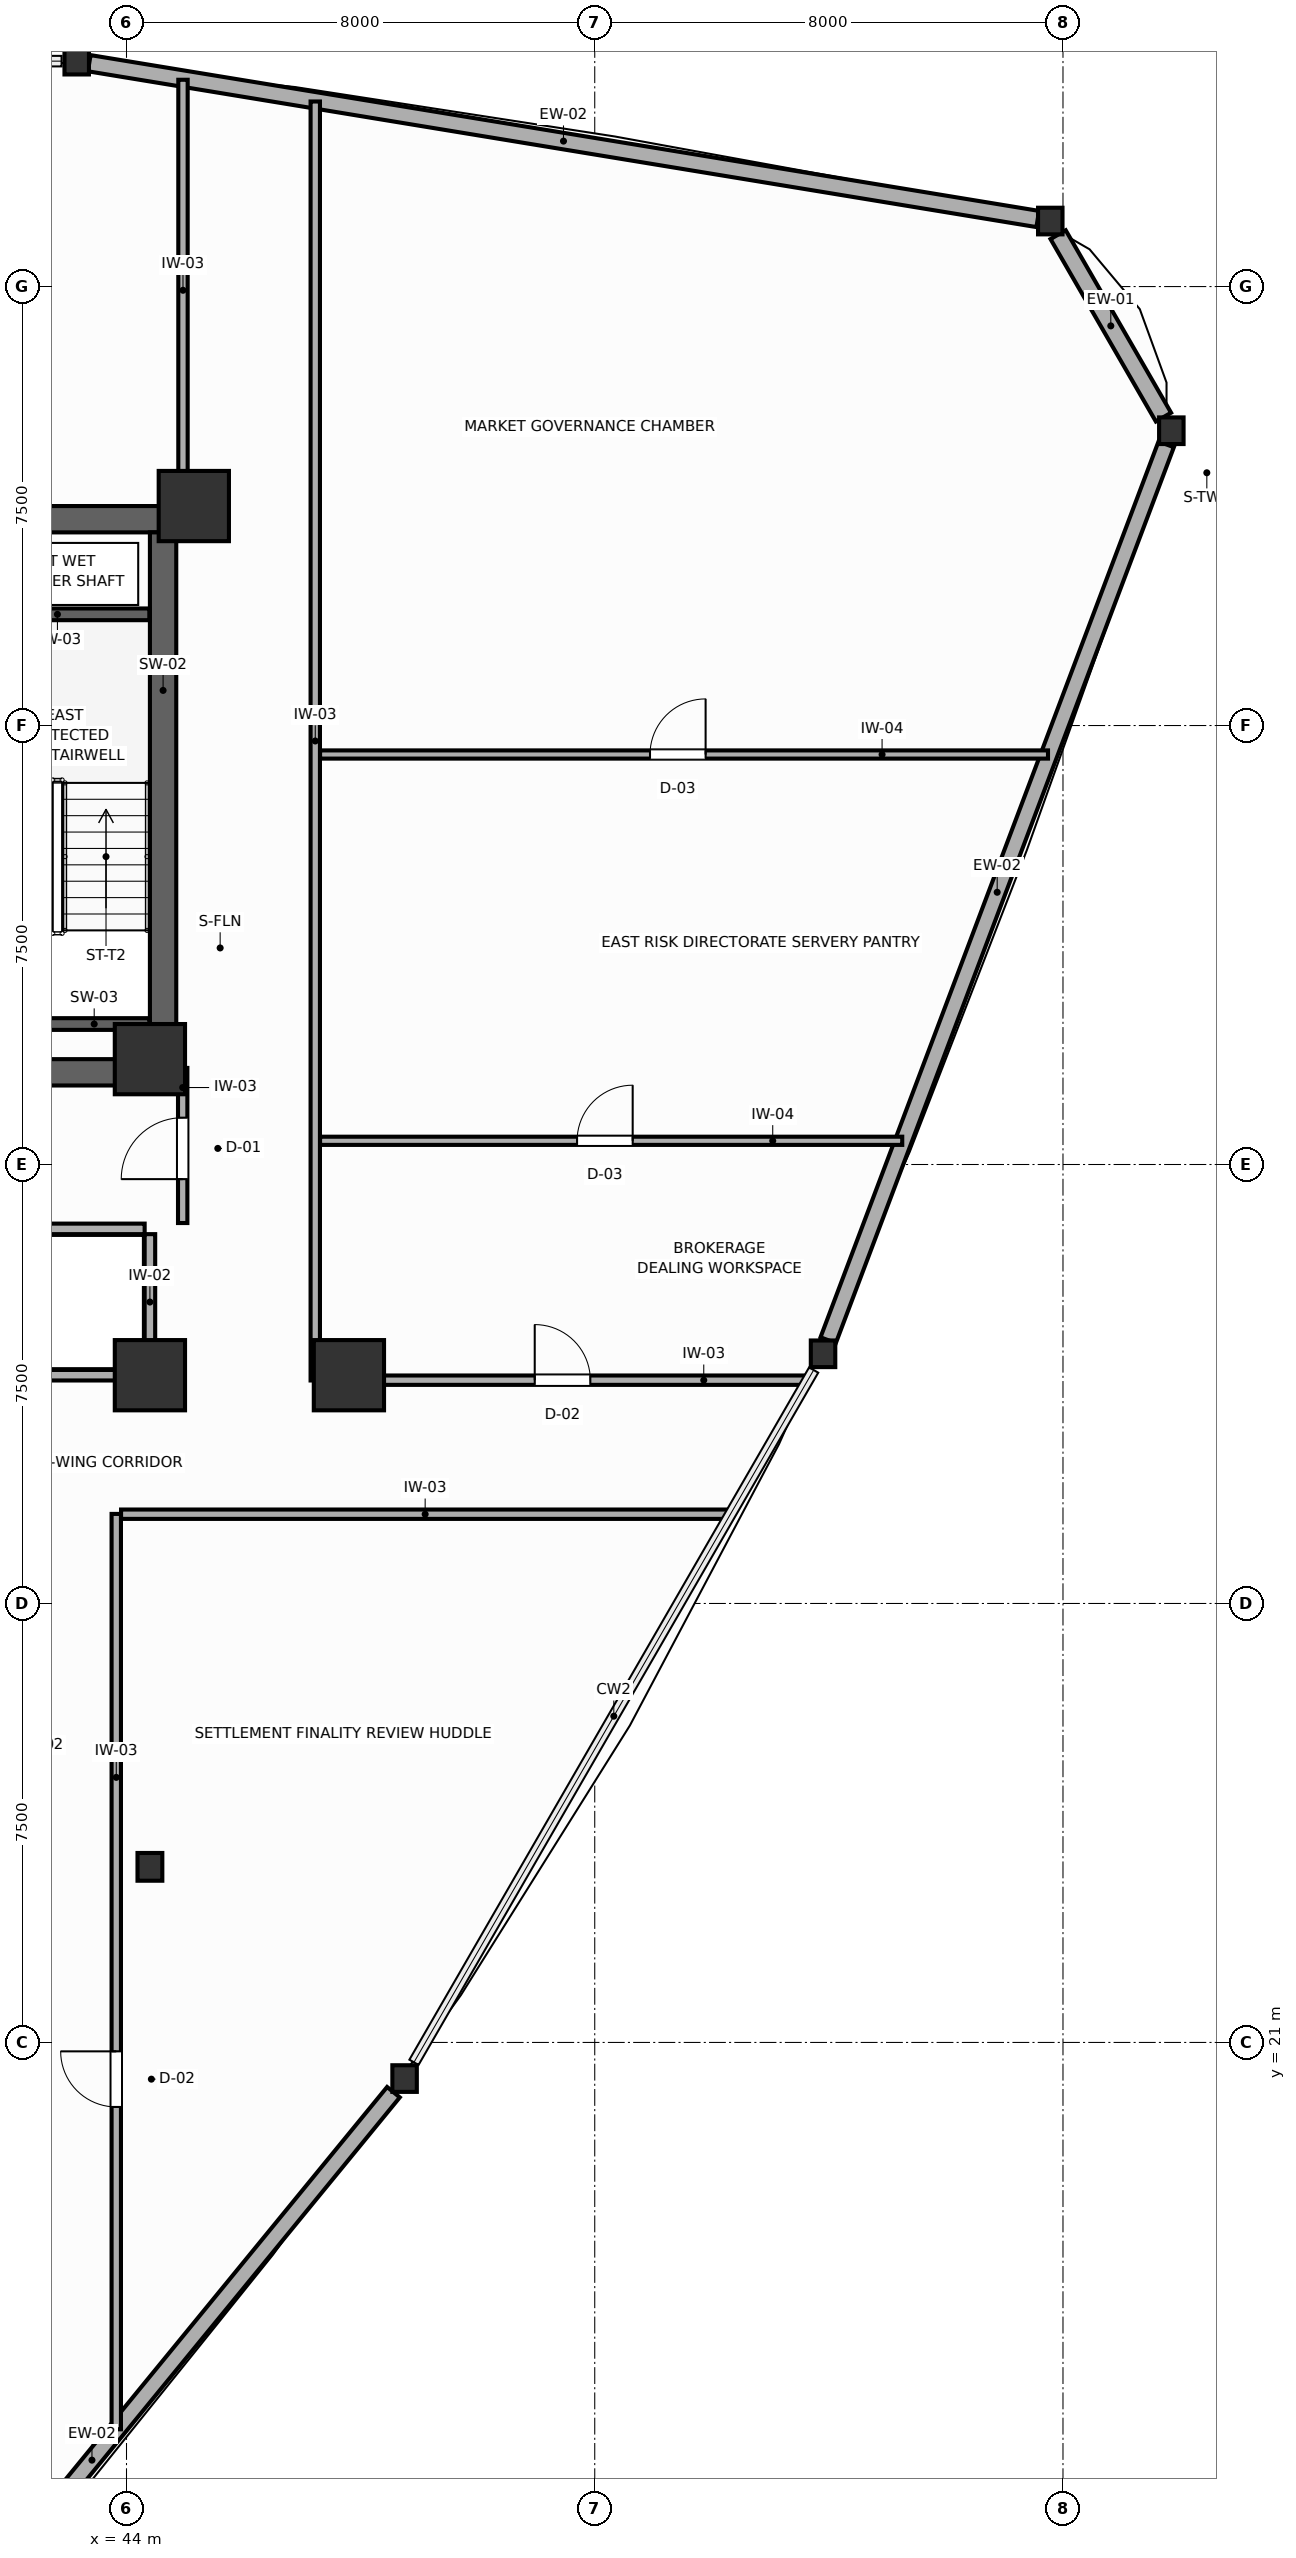
"""IFC4 building model, lengths in metres.
Left out: names, types, materials, properties, quantities, classifications, styles, units other than length and angle.
Written with IfcOpenShell. Run it as: python <this file> out.ifc"""

import sys

from ifc_helpers import new_model, si_unit, direction, frame, frame_2d, origin, origin_2d, place, context, subcontext, project, spatial, rectangle, i_section, extrude, source, transform, mapped, element, fill, save


model = new_model("IFC4")
c1 = context("Model", 3, precision=1e-05, world=origin(), true_north=direction((0.0, 1.0)))
c2 = subcontext(c1, "Body", "Model", "MODEL_VIEW")
j1 = project(units=[si_unit("LENGTHUNIT", "METRE"), si_unit("PLANEANGLEUNIT", "RADIAN")], contexts=[c1])
p1 = place(None, origin())
s1 = spatial("IfcSite", under=j1, at=p1, CompositionType="ELEMENT")
p2 = place(p1, origin())
s2 = spatial("IfcBuilding", under=s1, at=p2, CompositionType="ELEMENT")
p3 = place(p2, frame((0.0, 0.0, 106.2)))
s3 = spatial("IfcBuildingStorey", under=s2, at=p3, CompositionType="ELEMENT", Elevation=106.2)
p4 = place(p3, frame((27.15, 47.025, 0.0), z_axis=(0.0, 0.0, 1.0), x_axis=(1.0, 0.0, 0.0)))
e1 = element("IfcWall", 1, at=p4, inside=s3, PredefinedType="SHEAR", context=c2, shape_type="SweptSolid", body=[
    extrude(rectangle(XDim=17.7, YDim=0.45, at=frame_2d((8.85, 0.0))), origin(), (0.0, 0.0, 1.0), 3.6),
])
p5 = place(p3, frame((27.15, 37.575, 0.0), z_axis=(0.0, 0.0, 1.0), x_axis=(1.0, 0.0, 0.0)))
e2 = element("IfcWall", 2, at=p5, inside=s3, PredefinedType="SHEAR", context=c2, shape_type="SweptSolid", body=[
    extrude(rectangle(XDim=17.7, YDim=0.45, at=frame_2d((8.85, 0.0))), origin(), (0.0, 0.0, 1.0), 3.6),
])
p6 = place(p5, frame((4.875, 0.0, 0.0)))
e3 = element("IfcOpeningElement", 3, at=p6, cuts=e2, PredefinedType="OPENING", context=c2, shape_type="SweptSolid", body=[
    extrude(rectangle(XDim=1.05, YDim=2.1, at=frame_2d((0.525, 1.05))), frame((0.0, 0.235, 0.0), z_axis=(0.0, -1.0, 0.0), x_axis=(1.0, 0.0, 0.0)), (0.0, 0.0, 1.0), 0.47),
])
p7 = place(p5, frame((11.775, 0.0, 0.0)))
e4 = element("IfcOpeningElement", 4, at=p7, cuts=e2, PredefinedType="OPENING", context=c2, shape_type="SweptSolid", body=[
    extrude(rectangle(XDim=1.05, YDim=2.1, at=frame_2d((0.525, 1.05))), frame((0.0, 0.235, 0.0), z_axis=(0.0, -1.0, 0.0), x_axis=(1.0, 0.0, 0.0)), (0.0, 0.0, 1.0), 0.47),
])
p8 = place(p3, frame((44.625, 37.8, 0.0), z_axis=(0.0, 0.0, 1.0), x_axis=(0.0, 1.0, 0.0)))
e5 = element("IfcWall", 5, at=p8, inside=s3, PredefinedType="SHEAR", context=c2, shape_type="SweptSolid", body=[
    extrude(rectangle(XDim=9.0, YDim=0.45, at=frame_2d((4.5, 0.0))), origin(), (0.0, 0.0, 1.0), 3.6),
])
m1 = source(origin(), c2, "Body", "SweptSolid", [
    extrude(rectangle(XDim=1.2, YDim=1.2, at=origin_2d()), origin(), (0.0, 0.0, 1.0), 3.6),
])
for number, where, z_axis, x_axis in (
    (6, (45.15, 47.25, 0.0), (0.0, 0.0, 1.0), (1.0, 0.0, 0.0)),
    (7, (44.4, 37.8, 0.0), (0.0, 0.0, 1.0), (1.0, 0.0, 0.0)),
    (8, (44.4, 32.4, 0.0), (0.0, 0.0, 1.0), (1.0, 0.0, 0.0)),
    (9, (47.8, 32.4, 0.0), (0.0, 0.0, 1.0), (1.0, 0.0, 0.0)),
):
    element("IfcColumn", number, at=place(p3, frame(where, z_axis=z_axis, x_axis=x_axis)), inside=s3, PredefinedType="COLUMN", context=c2, shape_type="MappedRepresentation", body=[
        mapped(m1, transform((0.0, 0.0, 0.0), scale=1.0)),
    ])
m2 = source(origin(), c2, "Body", "SweptSolid", [
    extrude(i_section(OverallWidth=0.424, OverallDepth=0.474, WebThickness=0.045, FlangeThickness=0.072, FilletRadius=0.015, at=origin_2d()), origin(), (0.0, 0.0, 1.0), 3.6),
])
p9 = place(p3, frame((44.4, 24.0, 0.0), z_axis=(0.0, 0.0, 1.0), x_axis=(1.0, 0.0, 0.0)))
e10 = element("IfcColumn", 10, at=p9, inside=s3, PredefinedType="COLUMN", context=c2, shape_type="MappedRepresentation", body=[
    mapped(m2, transform((0.0, 0.0, 0.0), scale=1.0)),
])
m3 = source(origin(), c2, "Body", "SweptSolid", [
    extrude(i_section(OverallWidth=0.418, OverallDepth=0.455, WebThickness=0.039, FlangeThickness=0.063, FilletRadius=0.015, at=origin_2d()), origin(), (0.0, 0.0, 1.0), 3.6),
])
for number, where, z_axis, x_axis in (
    (11, (61.851, 48.537, 0.0), (0.0, 0.0, 1.0), (1.0, 0.0, 0.0)),
    (12, (59.783, 52.119, 0.0), (0.0, 0.0, 1.0), (1.0, 0.0, 0.0)),
    (13, (43.149, 54.852, 0.0), (0.0, 0.0, 1.0), (1.0, 0.0, 0.0)),
    (14, (48.751, 20.383, 0.0), (0.0, 0.0, 1.0), (1.0, 0.0, 0.0)),
    (15, (55.901, 32.766, 0.0), (0.0, 0.0, 1.0), (1.0, 0.0, 0.0)),
):
    element("IfcColumn", number, at=place(p3, frame(where, z_axis=z_axis, x_axis=x_axis)), inside=s3, PredefinedType="COLUMN", context=c2, shape_type="MappedRepresentation", body=[
        mapped(m3, transform((0.0, 0.0, 0.0), scale=1.0)),
    ])
p10 = place(p3, frame((61.717, 48.769, 0.0), z_axis=(0.0, 0.0, 1.0), x_axis=(-0.500012057535, 0.866018442252, 0.0)))
e16 = element("IfcWall", 16, at=p10, inside=s3, PredefinedType="SOLIDWALL", context=c2, shape_type="SweptSolid", body=[
    extrude(rectangle(XDim=3.6, YDim=0.3, at=frame_2d((1.8, 0.0))), origin(), (0.0, 0.0, 1.0), 1.87),
])
p11 = place(p3, frame((59.569, 52.155, 0.0), z_axis=(0.0, 0.0, 1.0), x_axis=(-0.986776921995, 0.162084256539, 0.0)))
e17 = element("IfcWall", 17, at=p11, inside=s3, PredefinedType="SOLIDWALL", context=c2, shape_type="SweptSolid", body=[
    extrude(rectangle(XDim=16.423, YDim=0.28, at=frame_2d((8.211, 0.0))), origin(), (0.0, 0.0, 1.0), 1.87),
])
p12 = place(p3, frame((38.259, 7.576, 0.0), z_axis=(0.0, 0.0, 1.0), x_axis=(0.633768446385, 0.773522822137, 0.0)))
e18 = element("IfcWall", 18, at=p12, inside=s3, PredefinedType="SOLIDWALL", context=c2, shape_type="SweptSolid", body=[
    extrude(rectangle(XDim=16.255, YDim=0.28, at=frame_2d((8.127, 0.0))), origin(), (0.0, 0.0, 1.0), 1.87),
])
p13 = place(p3, frame((55.988, 32.998, 0.0), z_axis=(0.0, 0.0, 1.0), x_axis=(0.353021512356, 0.935615204993, 0.0)))
e19 = element("IfcWall", 19, at=p13, inside=s3, PredefinedType="SOLIDWALL", context=c2, shape_type="SweptSolid", body=[
    extrude(rectangle(XDim=16.359, YDim=0.28, at=frame_2d((8.18, 0.0))), origin(), (0.0, 0.0, 1.0), 1.87),
])
for number, where, z_axis, x_axis in (
    (20, (41.25, 45.4, 0.0), (0.0, 0.0, 1.0), (1.0, 0.0, 0.0)),
    (21, (41.25, 38.4, 0.0), (0.0, 0.0, 1.0), (1.0, 0.0, 0.0)),
):
    element("IfcWall", number, at=place(p3, frame(where, z_axis=z_axis, x_axis=x_axis)), inside=s3, PredefinedType="SHEAR", context=c2, shape_type="SweptSolid", body=[
        extrude(rectangle(XDim=3.14, YDim=0.2, at=frame_2d((1.57, 0.0))), origin(), (0.0, 0.0, 1.0), 3.6),
    ])
p14 = place(p3, frame((42.39, 34.9, 0.0), z_axis=(0.0, 0.0, 1.0), x_axis=(1.0, 0.0, 0.0)))
e22 = element("IfcWall", 22, at=p14, inside=s3, PredefinedType="PARTITIONING", context=c2, shape_type="SweptSolid", body=[
    extrude(rectangle(XDim=1.92, YDim=0.18, at=frame_2d((0.96, 0.0))), origin(), (0.0, 0.0, 1.0), 3.4),
])
p15 = place(p3, frame((42.39, 32.4, 0.0), z_axis=(0.0, 0.0, 1.0), x_axis=(1.0, 0.0, 0.0)))
e23 = element("IfcWall", 23, at=p15, inside=s3, PredefinedType="PARTITIONING", context=c2, shape_type="SweptSolid", body=[
    extrude(rectangle(XDim=1.92, YDim=0.18, at=frame_2d((0.96, 0.0))), origin(), (0.0, 0.0, 1.0), 2.16),
])
p16 = place(p3, frame((44.4, 32.49, 0.0), z_axis=(0.0, 0.0, 1.0), x_axis=(0.0, 1.0, 0.0)))
e24 = element("IfcWall", 24, at=p16, inside=s3, PredefinedType="PARTITIONING", context=c2, shape_type="SweptSolid", body=[
    extrude(rectangle(XDim=2.32, YDim=0.18, at=frame_2d((1.16, 0.0))), origin(), (0.0, 0.0, 1.0), 3.4),
])
p17 = place(p3, frame((44.96, 35.0, 0.0), z_axis=(0.0, 0.0, 1.0), x_axis=(0.0, 1.0, 0.0)))
e25 = element("IfcWall", 25, at=p17, inside=s3, PredefinedType="PARTITIONING", context=c2, shape_type="SweptSolid", body=[
    extrude(rectangle(XDim=2.65, YDim=0.16, at=frame_2d((1.325, 0.0))), origin(), (0.0, 0.0, 1.0), 3.4),
])
p18 = place(p17, frame((0.75, 0.0, 0.0)))
e26 = element("IfcOpeningElement", 26, at=p18, cuts=e25, PredefinedType="OPENING", context=c2, shape_type="SweptSolid", body=[
    extrude(rectangle(XDim=1.05, YDim=2.1, at=frame_2d((0.525, 1.05))), frame((0.0, 0.09, 0.0), z_axis=(0.0, -1.0, 0.0), x_axis=(1.0, 0.0, 0.0)), (0.0, 0.0, 1.0), 0.18),
])
p19 = place(p3, frame((47.225, 32.31, 0.0), z_axis=(0.0, 0.0, 1.0), x_axis=(0.0, 1.0, 0.0)))
e27 = element("IfcWall", 27, at=p19, inside=s3, PredefinedType="PARTITIONING", context=c2, shape_type="SweptSolid", body=[
    extrude(rectangle(XDim=21.852, YDim=0.16, at=frame_2d((10.926, 0.0))), origin(), (0.0, 0.0, 1.0), 3.4),
])
p20 = place(p3, frame((43.825, 14.39, 0.0), z_axis=(0.0, 0.0, 1.0), x_axis=(0.0, 1.0, 0.0)))
e28 = element("IfcWall", 28, at=p20, inside=s3, PredefinedType="PARTITIONING", context=c2, shape_type="SweptSolid", body=[
    extrude(rectangle(XDim=15.64, YDim=0.16, at=frame_2d((7.82, 0.0))), origin(), (0.0, 0.0, 1.0), 3.4),
])
p21 = place(p20, frame((5.508, 0.0, 0.0)))
e29 = element("IfcOpeningElement", 29, at=p21, cuts=e28, PredefinedType="OPENING", context=c2, shape_type="SweptSolid", body=[
    extrude(rectangle(XDim=0.95, YDim=2.05, at=frame_2d((0.475, 1.025))), frame((0.0, 0.09, 0.0), z_axis=(0.0, -1.0, 0.0), x_axis=(1.0, 0.0, 0.0)), (0.0, 0.0, 1.0), 0.18),
])
p22 = place(p3, frame((43.907, 30.025, 0.0), z_axis=(0.0, 0.0, 1.0), x_axis=(1.0, 0.0, 0.0)))
e30 = element("IfcWall", 30, at=p22, inside=s3, PredefinedType="PARTITIONING", context=c2, shape_type="SweptSolid", body=[
    extrude(rectangle(XDim=10.391, YDim=0.16, at=frame_2d((5.196, 0.0))), origin(), (0.0, 0.0, 1.0), 3.4),
])
p23 = place(p3, frame((47.307, 32.315, 0.0), z_axis=(0.0, 0.0, 1.0), x_axis=(1.0, 0.0, 0.0)))
e31 = element("IfcWall", 31, at=p23, inside=s3, PredefinedType="PARTITIONING", context=c2, shape_type="SweptSolid", body=[
    extrude(rectangle(XDim=8.313, YDim=0.16, at=frame_2d((4.157, 0.0))), origin(), (0.0, 0.0, 1.0), 2.16),
])
p24 = place(p23, frame((3.668, 0.0, 0.0)))
e32 = element("IfcOpeningElement", 32, at=p24, cuts=e31, PredefinedType="OPENING", context=c2, shape_type="SweptSolid", body=[
    extrude(rectangle(XDim=0.95, YDim=2.05, at=frame_2d((0.475, 1.025))), frame((0.0, 0.09, 0.0), z_axis=(0.0, -1.0, 0.0), x_axis=(1.0, 0.0, 0.0)), (0.0, 0.0, 1.0), 0.18),
])
p25 = place(p3, frame((44.965, 47.34, 0.0), z_axis=(0.0, 0.0, 1.0), x_axis=(0.0, 1.0, 0.0)))
e33 = element("IfcWall", 33, at=p25, inside=s3, PredefinedType="PARTITIONING", context=c2, shape_type="SweptSolid", body=[
    extrude(rectangle(XDim=7.193, YDim=0.16, at=frame_2d((3.597, 0.0))), origin(), (0.0, 0.0, 1.0), 2.16),
])
p26 = place(p3, frame((47.307, 43.005, 0.0), z_axis=(0.0, 0.0, 1.0), x_axis=(1.0, 0.0, 0.0)))
e34 = element("IfcWall", 34, at=p26, inside=s3, PredefinedType="PARTITIONING", context=c2, shape_type="SweptSolid", body=[
    extrude(rectangle(XDim=12.437, YDim=0.14, at=frame_2d((6.219, 0.0))), origin(), (0.0, 0.0, 1.0), 3.4),
])
p27 = place(p26, frame((5.637, 0.0, 0.0)))
e35 = element("IfcOpeningElement", 35, at=p27, cuts=e34, PredefinedType="OPENING", context=c2, shape_type="SweptSolid", body=[
    extrude(rectangle(XDim=0.95, YDim=2.05, at=frame_2d((0.475, 1.025))), frame((0.0, 0.08, 0.0), z_axis=(0.0, -1.0, 0.0), x_axis=(1.0, 0.0, 0.0)), (0.0, 0.0, 1.0), 0.16),
])
p28 = place(p3, frame((47.307, 36.405, 0.0), z_axis=(0.0, 0.0, 1.0), x_axis=(1.0, 0.0, 0.0)))
e36 = element("IfcWall", 36, at=p28, inside=s3, PredefinedType="PARTITIONING", context=c2, shape_type="SweptSolid", body=[
    extrude(rectangle(XDim=9.947, YDim=0.14, at=frame_2d((4.973, 0.0))), origin(), (0.0, 0.0, 1.0), 3.4),
])
p29 = place(p28, frame((4.391, 0.0, 0.0)))
e37 = element("IfcOpeningElement", 37, at=p29, cuts=e36, PredefinedType="OPENING", context=c2, shape_type="SweptSolid", body=[
    extrude(rectangle(XDim=0.95, YDim=2.05, at=frame_2d((0.475, 1.025))), frame((0.0, 0.08, 0.0), z_axis=(0.0, -1.0, 0.0), x_axis=(1.0, 0.0, 0.0)), (0.0, 0.0, 1.0), 0.16),
])
p30 = place(p18, origin())
e38 = element("IfcDoor", 38, at=p30, inside=s3, OperationType="SINGLE_SWING_LEFT", PredefinedType="DOOR", context=c2, shape_type="SweptSolid", body=[
    extrude(rectangle(XDim=1.05, YDim=2.1, at=frame_2d((0.525, 1.05))), frame((0.0, 0.025, 0.0), z_axis=(0.0, -1.0, 0.0), x_axis=(1.0, 0.0, 0.0)), (0.0, 0.0, 1.0), 0.05),
])
fill(e26, e38)
p31 = place(p21, origin())
e39 = element("IfcDoor", 39, at=p31, inside=s3, OperationType="SINGLE_SWING_RIGHT", PredefinedType="DOOR", context=c2, shape_type="SweptSolid", body=[
    extrude(rectangle(XDim=0.95, YDim=2.05, at=frame_2d((0.475, 1.025))), frame((0.0, 0.025, 0.0), z_axis=(0.0, -1.0, 0.0), x_axis=(1.0, 0.0, 0.0)), (0.0, 0.0, 1.0), 0.05),
])
fill(e29, e39)
p32 = place(p24, origin())
e40 = element("IfcDoor", 40, at=p32, inside=s3, OperationType="SINGLE_SWING_LEFT", PredefinedType="DOOR", context=c2, shape_type="SweptSolid", body=[
    extrude(rectangle(XDim=0.95, YDim=2.05, at=frame_2d((0.475, 1.025))), frame((0.0, 0.025, 0.0), z_axis=(0.0, -1.0, 0.0), x_axis=(1.0, 0.0, 0.0)), (0.0, 0.0, 1.0), 0.05),
])
fill(e32, e40)
p33 = place(p27, origin())
e41 = element("IfcDoor", 41, at=p33, inside=s3, OperationType="SINGLE_SWING_RIGHT", PredefinedType="DOOR", context=c2, shape_type="SweptSolid", body=[
    extrude(rectangle(XDim=0.95, YDim=2.05, at=frame_2d((0.475, 1.025))), frame((0.0, 0.025, 0.0), z_axis=(0.0, -1.0, 0.0), x_axis=(1.0, 0.0, 0.0)), (0.0, 0.0, 1.0), 0.05),
])
fill(e35, e41)
p34 = place(p29, origin())
e42 = element("IfcDoor", 42, at=p34, inside=s3, OperationType="SINGLE_SWING_RIGHT", PredefinedType="DOOR", context=c2, shape_type="SweptSolid", body=[
    extrude(rectangle(XDim=0.95, YDim=2.05, at=frame_2d((0.475, 1.025))), frame((0.0, 0.025, 0.0), z_axis=(0.0, -1.0, 0.0), x_axis=(1.0, 0.0, 0.0)), (0.0, 0.0, 1.0), 0.05),
])
fill(e37, e42)
save(model, sys.argv[1])
